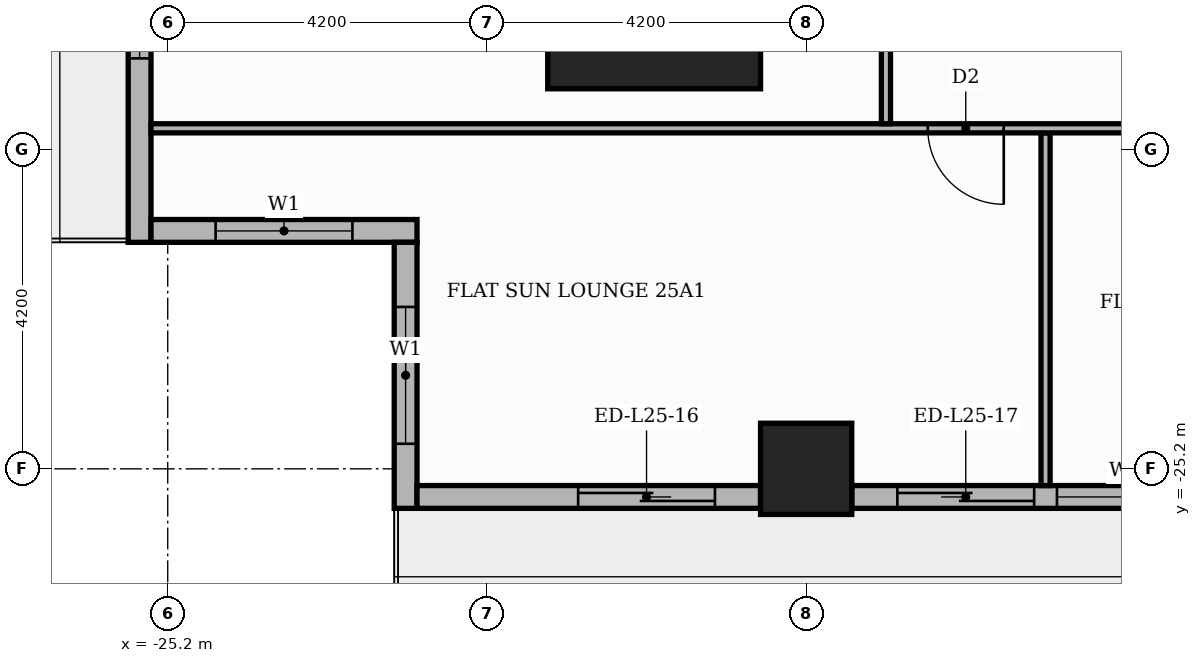
"""IFC4 building model, lengths in metres.
Left out: names, types, materials, properties, quantities, classifications, styles, units other than length and angle.
Written with IfcOpenShell. Run it as: python <this file> out.ifc"""

import sys

from ifc_helpers import new_model, si_unit, direction, frame, frame_2d, origin, origin_2d, place, context, subcontext, project, spatial, rectangle, extrude, element, fill, save


model = new_model("IFC4")
c1 = context("Model", 3, precision=1e-05, world=origin(), true_north=direction((0.0, 1.0)))
c2 = subcontext(c1, "Body", "Model", "MODEL_VIEW")
j1 = project(units=[si_unit("LENGTHUNIT", "METRE"), si_unit("PLANEANGLEUNIT", "RADIAN")], contexts=[c1])
p1 = place(None, origin())
s1 = spatial("IfcSite", under=j1, at=p1, CompositionType="ELEMENT")
p2 = place(p1, origin())
s2 = spatial("IfcBuilding", under=s1, at=p2, CompositionType="ELEMENT")
p3 = place(p2, frame((0.0, 0.0, 106.5)))
s3 = spatial("IfcBuildingStorey", under=s2, at=p3, CompositionType="ELEMENT", Elevation=106.5)
p4 = place(p3, frame((-18.8, -18.8, 0.0), z_axis=(0.0, 0.0, 1.0), x_axis=(1.0, 0.0, 0.0)))
e1 = element("IfcColumn", 1, at=p4, inside=s3, PredefinedType="COLUMN", context=c2, shape_type="SweptSolid", body=[
    extrude(rectangle(XDim=2.8, YDim=2.8, at=origin_2d()), origin(), (0.0, 0.0, 1.0), 3.9),
])
p5 = place(p3, frame((-16.8, -25.2, 0.0), z_axis=(0.0, 0.0, 1.0), x_axis=(1.0, 0.0, 0.0)))
e2 = element("IfcColumn", 2, at=p5, inside=s3, PredefinedType="COLUMN", context=c2, shape_type="SweptSolid", body=[
    extrude(rectangle(XDim=1.2, YDim=1.2, at=origin_2d()), origin(), (0.0, 0.0, 1.0), 3.9),
])
p6 = place(p3, frame((-25.57, -17.4, 0.0), z_axis=(0.0, 0.0, 1.0), x_axis=(0.0, -1.0, 0.0)))
e3 = element("IfcWall", 3, at=p6, inside=s3, PredefinedType="STANDARD", context=c2, shape_type="SweptSolid", body=[
    extrude(rectangle(XDim=4.82, YDim=0.3, at=frame_2d((2.41, 0.0))), origin(), (0.0, 0.0, 1.0), 3.48),
])
p7 = place(p6, frame((0.6, 0.0, 0.9)))
e4 = element("IfcOpeningElement", 4, at=p7, cuts=e3, PredefinedType="OPENING", context=c2, shape_type="SweptSolid", body=[
    extrude(rectangle(XDim=1.8, YDim=2.1, at=frame_2d((0.9, 1.05))), frame((0.0, 0.16, 0.0), z_axis=(0.0, -1.0, 0.0), x_axis=(1.0, 0.0, 0.0)), (0.0, 0.0, 1.0), 0.32),
])
p8 = place(p3, frame((-25.42, -22.07, 0.0), z_axis=(0.0, 0.0, 1.0), x_axis=(1.0, 0.0, 0.0)))
e5 = element("IfcWall", 5, at=p8, inside=s3, PredefinedType="STANDARD", context=c2, shape_type="SweptSolid", body=[
    extrude(rectangle(XDim=3.5, YDim=0.3, at=frame_2d((1.75, 0.0))), origin(), (0.0, 0.0, 1.0), 3.48),
])
p9 = place(p8, frame((0.85, 0.0, 0.9)))
e6 = element("IfcOpeningElement", 6, at=p9, cuts=e5, PredefinedType="OPENING", context=c2, shape_type="SweptSolid", body=[
    extrude(rectangle(XDim=1.8, YDim=2.1, at=frame_2d((0.9, 1.05))), frame((0.0, 0.16, 0.0), z_axis=(0.0, -1.0, 0.0), x_axis=(1.0, 0.0, 0.0)), (0.0, 0.0, 1.0), 0.32),
])
p10 = place(p3, frame((-22.07, -22.22, 0.0), z_axis=(0.0, 0.0, 1.0), x_axis=(0.0, -1.0, 0.0)))
e7 = element("IfcWall", 7, at=p10, inside=s3, PredefinedType="STANDARD", context=c2, shape_type="SweptSolid", body=[
    extrude(rectangle(XDim=3.5, YDim=0.3, at=frame_2d((1.75, 0.0))), origin(), (0.0, 0.0, 1.0), 3.48),
])
p11 = place(p10, frame((0.85, 0.0, 0.9)))
e8 = element("IfcOpeningElement", 8, at=p11, cuts=e7, PredefinedType="OPENING", context=c2, shape_type="SweptSolid", body=[
    extrude(rectangle(XDim=1.8, YDim=2.1, at=frame_2d((0.9, 1.05))), frame((0.0, 0.16, 0.0), z_axis=(0.0, -1.0, 0.0), x_axis=(1.0, 0.0, 0.0)), (0.0, 0.0, 1.0), 0.32),
])
p12 = place(p3, frame((-21.92, -25.57, 0.0), z_axis=(0.0, 0.0, 1.0), x_axis=(1.0, 0.0, 0.0)))
e9 = element("IfcWall", 9, at=p12, inside=s3, PredefinedType="STANDARD", context=c2, shape_type="SweptSolid", body=[
    extrude(rectangle(XDim=4.52, YDim=0.3, at=frame_2d((2.26, 0.0))), origin(), (0.0, 0.0, 1.0), 3.48),
])
p13 = place(p12, frame((2.12, 0.0, 0.0)))
e10 = element("IfcOpeningElement", 10, at=p13, cuts=e9, PredefinedType="OPENING", context=c2, shape_type="SweptSolid", body=[
    extrude(rectangle(XDim=1.8, YDim=2.4, at=frame_2d((0.9, 1.2))), frame((0.0, 0.16, 0.0), z_axis=(0.0, -1.0, 0.0), x_axis=(1.0, 0.0, 0.0)), (0.0, 0.0, 1.0), 0.32),
])
p14 = place(p3, frame((-16.2, -25.57, 0.0), z_axis=(0.0, 0.0, 1.0), x_axis=(1.0, 0.0, 0.0)))
e11 = element("IfcWall", 11, at=p14, inside=s3, PredefinedType="STANDARD", context=c2, shape_type="SweptSolid", body=[
    extrude(rectangle(XDim=7.2, YDim=0.3, at=frame_2d((3.6, 0.0))), origin(), (0.0, 0.0, 1.0), 3.48),
])
p15 = place(p14, frame((0.6, 0.0, 0.0)))
e12 = element("IfcOpeningElement", 12, at=p15, cuts=e11, PredefinedType="OPENING", context=c2, shape_type="SweptSolid", body=[
    extrude(rectangle(XDim=1.8, YDim=2.4, at=frame_2d((0.9, 1.2))), frame((0.0, 0.16, 0.0), z_axis=(0.0, -1.0, 0.0), x_axis=(1.0, 0.0, 0.0)), (0.0, 0.0, 1.0), 0.32),
])
p16 = place(p14, frame((2.7, 0.0, 0.9)))
e13 = element("IfcOpeningElement", 13, at=p16, cuts=e11, PredefinedType="OPENING", context=c2, shape_type="SweptSolid", body=[
    extrude(rectangle(XDim=1.8, YDim=2.1, at=frame_2d((0.9, 1.05))), frame((0.0, 0.16, 0.0), z_axis=(0.0, -1.0, 0.0), x_axis=(1.0, 0.0, 0.0)), (0.0, 0.0, 1.0), 0.32),
])
p17 = place(p14, frame((4.8, 0.0, 0.0)))
e14 = element("IfcOpeningElement", 14, at=p17, cuts=e11, PredefinedType="OPENING", context=c2, shape_type="SweptSolid", body=[
    extrude(rectangle(XDim=1.8, YDim=2.4, at=frame_2d((0.9, 1.2))), frame((0.0, 0.16, 0.0), z_axis=(0.0, -1.0, 0.0), x_axis=(1.0, 0.0, 0.0)), (0.0, 0.0, 1.0), 0.32),
])
p18 = place(p3, frame((-13.65, -25.42, 0.0), z_axis=(0.0, 0.0, 1.0), x_axis=(0.0, 1.0, 0.0)))
e15 = element("IfcWall", 15, at=p18, inside=s3, PredefinedType="PARTITIONING", context=c2, shape_type="SweptSolid", body=[
    extrude(rectangle(XDim=4.64, YDim=0.12, at=frame_2d((2.32, 0.0))), origin(), (0.0, 0.0, 1.0), 3.48),
])
p19 = place(p3, frame((-25.42, -20.72, 0.0), z_axis=(0.0, 0.0, 1.0), x_axis=(1.0, 0.0, 0.0)))
e16 = element("IfcWall", 16, at=p19, inside=s3, PredefinedType="PARTITIONING", context=c2, shape_type="SweptSolid", body=[
    extrude(rectangle(XDim=38.97, YDim=0.12, at=frame_2d((19.485, 0.0))), origin(), (0.0, 0.0, 1.0), 3.48),
])
p20 = place(p19, frame((10.22, 0.0, 0.0)))
e17 = element("IfcOpeningElement", 17, at=p20, cuts=e16, PredefinedType="OPENING", context=c2, shape_type="SweptSolid", body=[
    extrude(rectangle(XDim=1.0, YDim=2.1, at=frame_2d((0.5, 1.05))), frame((0.0, 0.07, 0.0), z_axis=(0.0, -1.0, 0.0), x_axis=(1.0, 0.0, 0.0)), (0.0, 0.0, 1.0), 0.14),
])
p21 = place(p19, frame((15.47, 0.0, 0.0)))
e18 = element("IfcOpeningElement", 18, at=p21, cuts=e16, PredefinedType="OPENING", context=c2, shape_type="SweptSolid", body=[
    extrude(rectangle(XDim=1.0, YDim=2.1, at=frame_2d((0.5, 1.05))), frame((0.0, 0.07, 0.0), z_axis=(0.0, -1.0, 0.0), x_axis=(1.0, 0.0, 0.0)), (0.0, 0.0, 1.0), 0.14),
])
p22 = place(p19, frame((23.92, 0.0, 0.0)))
e19 = element("IfcOpeningElement", 19, at=p22, cuts=e16, PredefinedType="OPENING", context=c2, shape_type="SweptSolid", body=[
    extrude(rectangle(XDim=0.9, YDim=2.1, at=frame_2d((0.45, 1.05))), frame((0.0, 0.07, 0.0), z_axis=(0.0, -1.0, 0.0), x_axis=(1.0, 0.0, 0.0)), (0.0, 0.0, 1.0), 0.14),
])
p23 = place(p19, frame((34.42, 0.0, 0.0)))
e20 = element("IfcOpeningElement", 20, at=p23, cuts=e16, PredefinedType="OPENING", context=c2, shape_type="SweptSolid", body=[
    extrude(rectangle(XDim=0.9, YDim=2.1, at=frame_2d((0.45, 1.05))), frame((0.0, 0.07, 0.0), z_axis=(0.0, -1.0, 0.0), x_axis=(1.0, 0.0, 0.0)), (0.0, 0.0, 1.0), 0.14),
])
p24 = place(p3, frame((-15.75, -20.66, 0.0), z_axis=(0.0, 0.0, 1.0), x_axis=(0.0, 1.0, 0.0)))
e21 = element("IfcWall", 21, at=p24, inside=s3, PredefinedType="PARTITIONING", context=c2, shape_type="SweptSolid", body=[
    extrude(rectangle(XDim=6.91, YDim=0.12, at=frame_2d((3.455, 0.0))), origin(), (0.0, 0.0, 1.0), 3.48),
])
p25 = place(p24, frame((3.025, 0.0, 0.0)))
e22 = element("IfcOpeningElement", 22, at=p25, cuts=e21, PredefinedType="OPENING", context=c2, shape_type="SweptSolid", body=[
    extrude(rectangle(XDim=0.9, YDim=2.1, at=frame_2d((0.45, 1.05))), frame((0.0, 0.07, 0.0), z_axis=(0.0, -1.0, 0.0), x_axis=(1.0, 0.0, 0.0)), (0.0, 0.0, 1.0), 0.14),
])
p26 = place(p7, origin())
e23 = element("IfcWindow", 23, at=p26, inside=s3, PartitioningType="SINGLE_PANEL", PredefinedType="WINDOW", context=c2, shape_type="SweptSolid", body=[
    extrude(rectangle(XDim=1.8, YDim=2.1, at=frame_2d((0.9, 1.05))), frame((0.0, 0.03, 0.0), z_axis=(0.0, -1.0, 0.0), x_axis=(1.0, 0.0, 0.0)), (0.0, 0.0, 1.0), 0.06),
])
fill(e4, e23)
p27 = place(p9, origin())
e24 = element("IfcWindow", 24, at=p27, inside=s3, PartitioningType="SINGLE_PANEL", PredefinedType="WINDOW", context=c2, shape_type="SweptSolid", body=[
    extrude(rectangle(XDim=1.8, YDim=2.1, at=frame_2d((0.9, 1.05))), frame((0.0, 0.03, 0.0), z_axis=(0.0, -1.0, 0.0), x_axis=(1.0, 0.0, 0.0)), (0.0, 0.0, 1.0), 0.06),
])
fill(e6, e24)
p28 = place(p11, origin())
e25 = element("IfcWindow", 25, at=p28, inside=s3, PartitioningType="SINGLE_PANEL", PredefinedType="WINDOW", context=c2, shape_type="SweptSolid", body=[
    extrude(rectangle(XDim=1.8, YDim=2.1, at=frame_2d((0.9, 1.05))), frame((0.0, 0.03, 0.0), z_axis=(0.0, -1.0, 0.0), x_axis=(1.0, 0.0, 0.0)), (0.0, 0.0, 1.0), 0.06),
])
fill(e8, e25)
p29 = place(p13, origin())
e26 = element("IfcDoor", 26, at=p29, inside=s3, OperationType="SLIDING_TO_RIGHT", PredefinedType="DOOR", context=c2, shape_type="SweptSolid", body=[
    extrude(rectangle(XDim=1.8, YDim=2.4, at=frame_2d((0.9, 1.2))), frame((0.0, 0.025, 0.0), z_axis=(0.0, -1.0, 0.0), x_axis=(1.0, 0.0, 0.0)), (0.0, 0.0, 1.0), 0.05),
])
fill(e10, e26)
p30 = place(p15, origin())
e27 = element("IfcDoor", 27, at=p30, inside=s3, OperationType="SLIDING_TO_LEFT", PredefinedType="DOOR", context=c2, shape_type="SweptSolid", body=[
    extrude(rectangle(XDim=1.8, YDim=2.4, at=frame_2d((0.9, 1.2))), frame((0.0, 0.025, 0.0), z_axis=(0.0, -1.0, 0.0), x_axis=(1.0, 0.0, 0.0)), (0.0, 0.0, 1.0), 0.05),
])
fill(e12, e27)
p31 = place(p16, origin())
e28 = element("IfcWindow", 28, at=p31, inside=s3, PartitioningType="SINGLE_PANEL", PredefinedType="WINDOW", context=c2, shape_type="SweptSolid", body=[
    extrude(rectangle(XDim=1.8, YDim=2.1, at=frame_2d((0.9, 1.05))), frame((0.0, 0.03, 0.0), z_axis=(0.0, -1.0, 0.0), x_axis=(1.0, 0.0, 0.0)), (0.0, 0.0, 1.0), 0.06),
])
fill(e13, e28)
p32 = place(p20, frame((1.0, 0.0, 0.0), z_axis=(0.0, 0.0, 1.0), x_axis=(-1.0, 0.0, 0.0)))
e29 = element("IfcDoor", 29, at=p32, inside=s3, OperationType="SINGLE_SWING_RIGHT", PredefinedType="DOOR", context=c2, shape_type="SweptSolid", body=[
    extrude(rectangle(XDim=1.0, YDim=2.1, at=frame_2d((0.5, 1.05))), frame((0.0, 0.025, 0.0), z_axis=(0.0, -1.0, 0.0), x_axis=(1.0, 0.0, 0.0)), (0.0, 0.0, 1.0), 0.05),
])
fill(e17, e29)
save(model, sys.argv[1])
